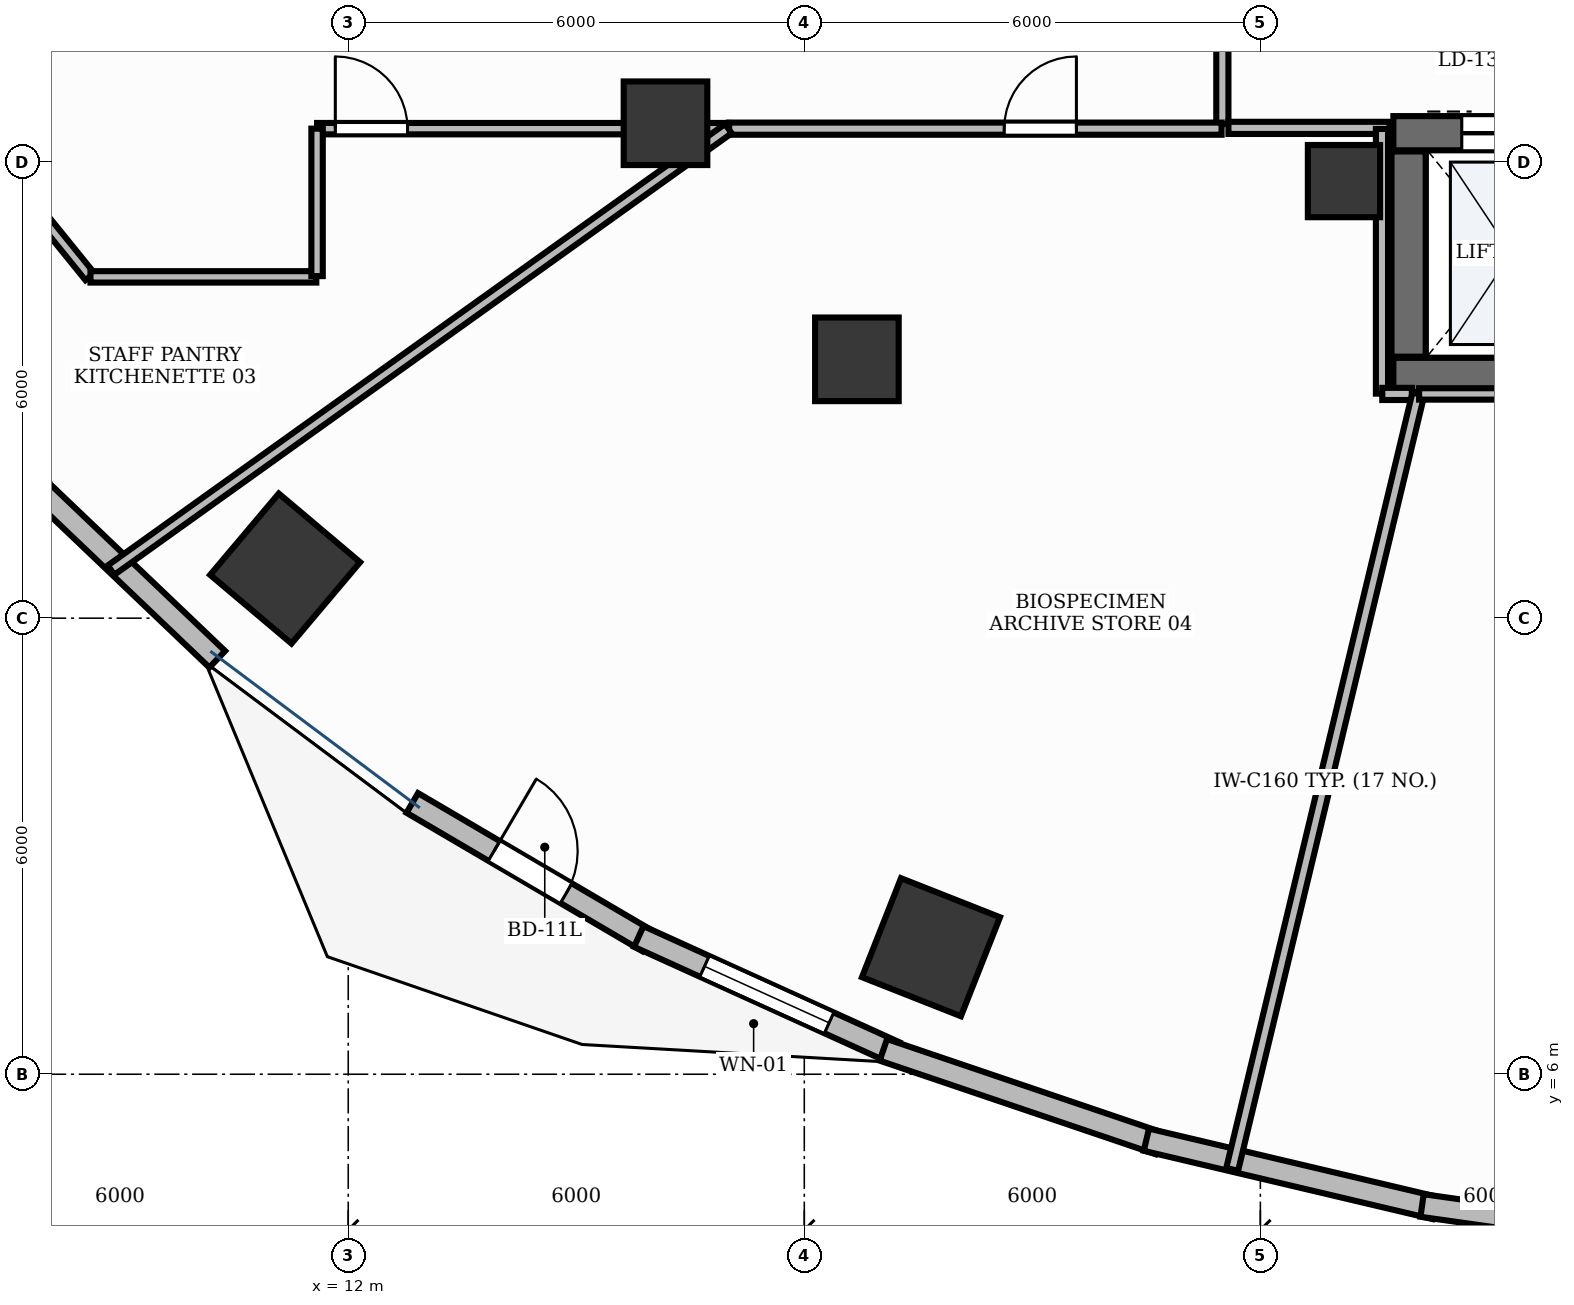
"""IFC4 building model, lengths in metres.
Left out: names, types, materials, properties, quantities, classifications, styles, units other than length and angle.
Written with IfcOpenShell. Run it as: python <this file> out.ifc"""

import sys

from ifc_helpers import new_model, si_unit, direction, frame, frame_2d, origin, origin_2d, place, context, subcontext, project, spatial, rectangle, extrude, element, fill, save


model = new_model("IFC4")
c1 = context("Model", 3, precision=1e-05, world=origin(), true_north=direction((0.0, 1.0)))
c2 = subcontext(c1, "Body", "Model", "MODEL_VIEW")
j1 = project(units=[si_unit("LENGTHUNIT", "METRE"), si_unit("PLANEANGLEUNIT", "RADIAN")], contexts=[c1])
p1 = place(None, origin())
s1 = spatial("IfcSite", under=j1, at=p1, CompositionType="ELEMENT")
p2 = place(p1, origin())
s2 = spatial("IfcBuilding", under=s1, at=p2, CompositionType="ELEMENT")
p3 = place(p2, frame((0.0, 0.0, 34.2)))
s3 = spatial("IfcBuildingStorey", under=s2, at=p3, CompositionType="ELEMENT", Elevation=34.2)
p4 = place(p3, frame((25.75, 15.2, 0.0), z_axis=(0.0, 0.0, 1.0), x_axis=(1.0, 0.0, 0.0)))
e1 = element("IfcWall", 1, at=p4, inside=s3, PredefinedType="SHEAR", context=c2, shape_type="SweptSolid", body=[
    extrude(rectangle(XDim=3.1, YDim=0.45, at=frame_2d((1.55, 0.0))), origin(), (0.0, 0.0, 1.0), 3.9),
])
p5 = place(p3, frame((25.75, 18.38, 0.0), z_axis=(0.0, 0.0, 1.0), x_axis=(1.0, 0.0, 0.0)))
e2 = element("IfcWall", 2, at=p5, inside=s3, PredefinedType="SHEAR", context=c2, shape_type="SweptSolid", body=[
    extrude(rectangle(XDim=3.1, YDim=0.45, at=frame_2d((1.55, 0.0))), origin(), (0.0, 0.0, 1.0), 3.9),
])
p6 = place(p5, frame((0.9, 0.0, 0.0)))
e3 = element("IfcOpeningElement", 3, at=p6, cuts=e2, PredefinedType="OPENING", context=c2, shape_type="SweptSolid", body=[
    extrude(rectangle(XDim=1.3, YDim=2.2, at=frame_2d((0.65, 1.1))), frame((0.0, 0.24, 0.0), z_axis=(0.0, -1.0, 0.0), x_axis=(1.0, 0.0, 0.0)), (0.0, 0.0, 1.0), 0.48),
])
p7 = place(p3, frame((25.95, 15.44, 0.0), z_axis=(0.0, 0.0, 1.0), x_axis=(0.0, 1.0, 0.0)))
e4 = element("IfcWall", 4, at=p7, inside=s3, PredefinedType="SHEAR", context=c2, shape_type="SweptSolid", body=[
    extrude(rectangle(XDim=2.7, YDim=0.45, at=frame_2d((1.35, 0.0))), origin(), (0.0, 0.0, 1.0), 3.9),
])
p8 = place(p3, frame((25.1, 17.75, -0.0), z_axis=(0.0, 0.0, 1.0), x_axis=(1.0, 0.0, 0.0)))
e5 = element("IfcColumn", 5, at=p8, inside=s3, PredefinedType="PILASTER", context=c2, shape_type="SweptSolid", body=[
    extrude(rectangle(XDim=0.95, YDim=0.95, at=origin_2d()), origin(), (0.0, 0.0, 1.0), 3.901),
])
p9 = place(p3, frame((16.174, 18.511, -0.0), z_axis=(0.0, 0.0, 1.0), x_axis=(1.0, 0.0, 0.0)))
e6 = element("IfcColumn", 6, at=p9, inside=s3, PredefinedType="COLUMN", context=c2, shape_type="SweptSolid", body=[
    extrude(rectangle(XDim=1.1, YDim=1.1, at=origin_2d()), origin(), (0.0, 0.0, 1.0), 3.901),
])
p10 = place(p3, frame((11.17, 12.653, -0.0), z_axis=(0.0, 0.0, 1.0), x_axis=(-0.764246456939, 0.644924300253, 0.0)))
e7 = element("IfcColumn", 7, at=p10, inside=s3, PredefinedType="COLUMN", context=c2, shape_type="SweptSolid", body=[
    extrude(rectangle(XDim=1.4, YDim=1.4, at=origin_2d()), origin(), (0.0, 0.0, 1.0), 3.901),
])
p11 = place(p3, frame((18.692, 15.405, -0.0), z_axis=(0.0, 0.0, 1.0), x_axis=(1.0, 0.0, 0.0)))
e8 = element("IfcColumn", 8, at=p11, inside=s3, PredefinedType="COLUMN", context=c2, shape_type="SweptSolid", body=[
    extrude(rectangle(XDim=1.1, YDim=1.1, at=origin_2d()), origin(), (0.0, 0.0, 1.0), 3.901),
])
p12 = place(p3, frame((19.667, 7.671, -0.0), z_axis=(0.0, 0.0, 1.0), x_axis=(-0.930225540858, 0.366988341962, 0.0)))
e9 = element("IfcColumn", 9, at=p12, inside=s3, PredefinedType="COLUMN", context=c2, shape_type="SweptSolid", body=[
    extrude(rectangle(XDim=1.4, YDim=1.4, at=origin_2d()), origin(), (0.0, 0.0, 1.0), 3.901),
])
p13 = place(p3, frame((12.843, 9.569, 0.0), z_axis=(0.0, 0.0, 1.0), x_axis=(0.862473134325, -0.506102847817, 0.0)))
e10 = element("IfcWall", 10, at=p13, inside=s3, PredefinedType="STANDARD", context=c2, shape_type="SweptSolid", body=[
    extrude(rectangle(XDim=3.595, YDim=0.3, at=frame_2d((1.798, 0.0))), origin(), (0.0, 0.0, 1.0), 3.9),
])
p14 = place(p13, frame((1.248, 0.0, 0.0)))
e11 = element("IfcOpeningElement", 11, at=p14, cuts=e10, PredefinedType="OPENING", context=c2, shape_type="SweptSolid", body=[
    extrude(rectangle(XDim=1.1, YDim=2.15, at=frame_2d((0.55, 1.075))), frame((0.0, 0.165, 0.0), z_axis=(0.0, -1.0, 0.0), x_axis=(1.0, 0.0, 0.0)), (0.0, 0.0, 1.0), 0.33),
])
p15 = place(p3, frame((15.822, 7.812, 0.0), z_axis=(0.0, 0.0, 1.0), x_axis=(0.910608120407, -0.413270917254, 0.0)))
e12 = element("IfcWall", 12, at=p15, inside=s3, PredefinedType="STANDARD", context=c2, shape_type="SweptSolid", body=[
    extrude(rectangle(XDim=3.7, YDim=0.3, at=frame_2d((1.85, 0.0))), origin(), (0.0, 0.0, 1.0), 3.9),
])
p16 = place(p15, frame((0.95, 0.0, 0.9)))
e13 = element("IfcOpeningElement", 13, at=p16, cuts=e12, PredefinedType="OPENING", context=c2, shape_type="SweptSolid", body=[
    extrude(rectangle(XDim=1.8, YDim=2.1, at=frame_2d((0.9, 1.05))), frame((0.0, 0.165, 0.0), z_axis=(0.0, -1.0, 0.0), x_axis=(1.0, 0.0, 0.0)), (0.0, 0.0, 1.0), 0.33),
])
p17 = place(p3, frame((7.814, 13.808, 0.0), z_axis=(0.0, 0.0, 1.0), x_axis=(0.72369587847, -0.69011902994, 0.0)))
e14 = element("IfcWall", 14, at=p17, inside=s3, PredefinedType="STANDARD", context=c2, shape_type="SweptSolid", body=[
    extrude(rectangle(XDim=3.403, YDim=0.3, at=frame_2d((1.701, 0.0))), origin(), (0.0, 0.0, 1.0), 3.9),
])
p18 = place(p3, frame((19.04, 6.321, 0.0), z_axis=(0.0, 0.0, 1.0), x_axis=(0.94702579403, -0.321157508773, 0.0)))
e15 = element("IfcWall", 15, at=p18, inside=s3, PredefinedType="STANDARD", context=c2, shape_type="SweptSolid", body=[
    extrude(rectangle(XDim=3.83, YDim=0.3, at=frame_2d((1.915, 0.0))), origin(), (0.0, 0.0, 1.0), 3.47),
])
p19 = place(p3, frame((22.5, 5.138, 0.0), z_axis=(0.0, 0.0, 1.0), x_axis=(0.973197600754, -0.229970497863, 0.0)))
e16 = element("IfcWall", 16, at=p19, inside=s3, PredefinedType="STANDARD", context=c2, shape_type="SweptSolid", body=[
    extrude(rectangle(XDim=3.901, YDim=0.3, at=frame_2d((1.951, 0.0))), origin(), (0.0, 0.0, 1.0), 3.9),
])
p20 = place(p3, frame((26.128, 4.273, 0.0), z_axis=(0.0, 0.0, 1.0), x_axis=(0.990165832998, -0.139898617443, 0.0)))
e17 = element("IfcWall", 17, at=p20, inside=s3, PredefinedType="STANDARD", context=c2, shape_type="SweptSolid", body=[
    extrude(rectangle(XDim=3.951, YDim=0.3, at=frame_2d((1.976, 0.0))), origin(), (0.0, 0.0, 1.0), 3.47),
])
p21 = place(p3, frame((23.5, 18.5, 0.0), z_axis=(0.0, 0.0, 1.0), x_axis=(0.0, 1.0, 0.0)))
e18 = element("IfcWall", 18, at=p21, inside=s3, PredefinedType="PARTITIONING", context=c2, shape_type="SweptSolid", body=[
    extrude(rectangle(XDim=3.4, YDim=0.16, at=frame_2d((1.7, 0.0))), origin(), (0.0, 0.0, 1.0), 2.91),
])
p22 = place(p21, frame((1.175, 0.0, 0.0)))
e19 = element("IfcOpeningElement", 19, at=p22, cuts=e18, PredefinedType="OPENING", context=c2, shape_type="SweptSolid", body=[
    extrude(rectangle(XDim=1.05, YDim=2.15, at=frame_2d((0.525, 1.075))), frame((0.0, 0.095, 0.0), z_axis=(0.0, -1.0, 0.0), x_axis=(1.0, 0.0, 0.0)), (0.0, 0.0, 1.0), 0.19),
])
p23 = place(p3, frame((23.58, 18.45, 0.0), z_axis=(0.0, 0.0, 1.0), x_axis=(1.0, 0.0, 0.0)))
e20 = element("IfcWall", 20, at=p23, inside=s3, PredefinedType="PARTITIONING", context=c2, shape_type="SweptSolid", body=[
    extrude(rectangle(XDim=2.12, YDim=0.16, at=frame_2d((1.06, 0.0))), origin(), (0.0, 0.0, 1.0), 2.91),
])
p24 = place(p3, frame((11.59, 18.44, 0.0), z_axis=(0.0, 0.0, 1.0), x_axis=(1.0, 0.0, 0.0)))
e21 = element("IfcWall", 21, at=p24, inside=s3, PredefinedType="PARTITIONING", context=c2, shape_type="SweptSolid", body=[
    extrude(rectangle(XDim=5.411, YDim=0.15, at=frame_2d((2.706, 0.0))), origin(), (0.0, 0.0, 1.0), 2.91),
])
p25 = place(p24, frame((0.24, 0.0, 0.0)))
e22 = element("IfcOpeningElement", 22, at=p25, cuts=e21, PredefinedType="OPENING", context=c2, shape_type="SweptSolid", body=[
    extrude(rectangle(XDim=0.95, YDim=2.15, at=frame_2d((0.475, 1.075))), frame((0.0, 0.09, 0.0), z_axis=(0.0, -1.0, 0.0), x_axis=(1.0, 0.0, 0.0)), (0.0, 0.0, 1.0), 0.18),
])
p26 = place(p3, frame((17.011, 18.44, 0.0), z_axis=(0.0, 0.0, 1.0), x_axis=(1.0, 0.0, 0.0)))
e23 = element("IfcWall", 23, at=p26, inside=s3, PredefinedType="PARTITIONING", context=c2, shape_type="SweptSolid", body=[
    extrude(rectangle(XDim=6.479, YDim=0.16, at=frame_2d((3.24, 0.0))), origin(), (0.0, 0.0, 1.0), 2.91),
])
p27 = place(p26, frame((3.619, 0.0, 0.0)))
e24 = element("IfcOpeningElement", 24, at=p27, cuts=e23, PredefinedType="OPENING", context=c2, shape_type="SweptSolid", body=[
    extrude(rectangle(XDim=0.95, YDim=2.15, at=frame_2d((0.475, 1.075))), frame((0.0, 0.095, 0.0), z_axis=(0.0, -1.0, 0.0), x_axis=(1.0, 0.0, 0.0)), (0.0, 0.0, 1.0), 0.19),
])
p28 = place(p3, frame((7.792, 17.492, 0.0), z_axis=(0.0, 0.0, 1.0), x_axis=(0.629225554682, -0.777222748854, 0.0)))
e25 = element("IfcWall", 25, at=p28, inside=s3, PredefinedType="PARTITIONING", context=c2, shape_type="SweptSolid", body=[
    extrude(rectangle(XDim=1.285, YDim=0.15, at=frame_2d((0.643, 0.0))), origin(), (0.0, 0.0, 1.0), 2.91),
])
p29 = place(p3, frame((8.609, 16.49, 0.0), z_axis=(0.0, 0.0, 1.0), x_axis=(1.0, 0.0, 0.0)))
e26 = element("IfcWall", 26, at=p29, inside=s3, PredefinedType="PARTITIONING", context=c2, shape_type="SweptSolid", body=[
    extrude(rectangle(XDim=2.971, YDim=0.15, at=frame_2d((1.486, 0.0))), origin(), (0.0, 0.0, 1.0), 2.91),
])
p30 = place(p3, frame((11.59, 16.5, 0.0), z_axis=(0.0, 0.0, 1.0), x_axis=(0.0, 1.0, 0.0)))
e27 = element("IfcWall", 27, at=p30, inside=s3, PredefinedType="PARTITIONING", context=c2, shape_type="SweptSolid", body=[
    extrude(rectangle(XDim=1.94, YDim=0.15, at=frame_2d((0.97, 0.0))), origin(), (0.0, 0.0, 1.0), 2.91),
])
p31 = place(p3, frame((17.001, 18.44, 0.0), z_axis=(0.0, 0.0, 1.0), x_axis=(-0.813397935838, -0.581707656796, 0.0)))
e28 = element("IfcWall", 28, at=p31, inside=s3, PredefinedType="PARTITIONING", context=c2, shape_type="SweptSolid", body=[
    extrude(rectangle(XDim=9.984, YDim=0.15, at=frame_2d((4.992, 0.0))), origin(), (0.0, 0.0, 1.0), 2.91),
])
p32 = place(p3, frame((25.6, 18.436, 0.0), z_axis=(0.0, 0.0, 1.0), x_axis=(0.0, -1.0, 0.0)))
e29 = element("IfcWall", 29, at=p32, inside=s3, PredefinedType="PARTITIONING", context=c2, shape_type="SweptSolid", body=[
    extrude(rectangle(XDim=3.482, YDim=0.16, at=frame_2d((1.741, 0.0))), origin(), (0.0, 0.0, 1.0), 2.91),
])
p33 = place(p3, frame((25.604, 14.95, 0.0), z_axis=(0.0, 0.0, 1.0), x_axis=(1.0, 0.0, 0.0)))
e30 = element("IfcWall", 30, at=p33, inside=s3, PredefinedType="PARTITIONING", context=c2, shape_type="SweptSolid", body=[
    extrude(rectangle(XDim=0.389, YDim=0.16, at=frame_2d((0.195, 0.0))), origin(), (0.0, 0.0, 1.0), 2.91),
])
p34 = place(p3, frame((26.079, 14.95, 0.0), z_axis=(0.0, 0.0, 1.0), x_axis=(-0.233446881406, -0.972369556065, 0.0)))
e31 = element("IfcWall", 31, at=p34, inside=s3, PredefinedType="PARTITIONING", context=c2, shape_type="SweptSolid", body=[
    extrude(rectangle(XDim=10.491, YDim=0.16, at=frame_2d((5.246, 0.0))), origin(), (0.0, 0.0, 1.0), 2.91),
])
p35 = place(p3, frame((26.089, 14.95, 0.0), z_axis=(0.0, 0.0, 1.0), x_axis=(1.0, 0.0, 0.0)))
e32 = element("IfcWall", 32, at=p35, inside=s3, PredefinedType="PARTITIONING", context=c2, shape_type="SweptSolid", body=[
    extrude(rectangle(XDim=2.907, YDim=0.15, at=frame_2d((1.454, 0.0))), origin(), (0.0, 0.0, 1.0), 2.91),
])
p36 = place(p14, origin())
e33 = element("IfcDoor", 33, at=p36, inside=s3, OperationType="SINGLE_SWING_LEFT", PredefinedType="DOOR", context=c2, shape_type="SweptSolid", body=[
    extrude(rectangle(XDim=1.1, YDim=2.15, at=frame_2d((0.55, 1.075))), frame((0.0, 0.025, 0.0), z_axis=(0.0, -1.0, 0.0), x_axis=(1.0, 0.0, 0.0)), (0.0, 0.0, 1.0), 0.05),
])
fill(e11, e33)
p37 = place(p16, origin())
e34 = element("IfcWindow", 34, at=p37, inside=s3, PartitioningType="SINGLE_PANEL", PredefinedType="WINDOW", context=c2, shape_type="SweptSolid", body=[
    extrude(rectangle(XDim=1.8, YDim=2.1, at=frame_2d((0.9, 1.05))), frame((0.0, 0.03, 0.0), z_axis=(0.0, -1.0, 0.0), x_axis=(1.0, 0.0, 0.0)), (0.0, 0.0, 1.0), 0.06),
])
fill(e13, e34)
p38 = place(p6, origin())
e35 = element("IfcDoor", 35, at=p38, inside=s3, OperationType="DOUBLE_DOOR_SLIDING", PredefinedType="DOOR", context=c2, shape_type="SweptSolid", body=[
    extrude(rectangle(XDim=1.3, YDim=2.2, at=frame_2d((0.65, 1.1))), frame((0.0, 0.025, 0.0), z_axis=(0.0, -1.0, 0.0), x_axis=(1.0, 0.0, 0.0)), (0.0, 0.0, 1.0), 0.05),
])
fill(e3, e35)
p39 = place(p25, origin())
e36 = element("IfcDoor", 36, at=p39, inside=s3, OperationType="SINGLE_SWING_LEFT", PredefinedType="DOOR", context=c2, shape_type="SweptSolid", body=[
    extrude(rectangle(XDim=0.95, YDim=2.15, at=frame_2d((0.475, 1.075))), frame((0.0, 0.025, 0.0), z_axis=(0.0, -1.0, 0.0), x_axis=(1.0, 0.0, 0.0)), (0.0, 0.0, 1.0), 0.05),
])
fill(e22, e36)
p40 = place(p27, origin())
e37 = element("IfcDoor", 37, at=p40, inside=s3, OperationType="SINGLE_SWING_RIGHT", PredefinedType="DOOR", context=c2, shape_type="SweptSolid", body=[
    extrude(rectangle(XDim=0.95, YDim=2.15, at=frame_2d((0.475, 1.075))), frame((0.0, 0.025, 0.0), z_axis=(0.0, -1.0, 0.0), x_axis=(1.0, 0.0, 0.0)), (0.0, 0.0, 1.0), 0.05),
])
fill(e24, e37)
save(model, sys.argv[1])
